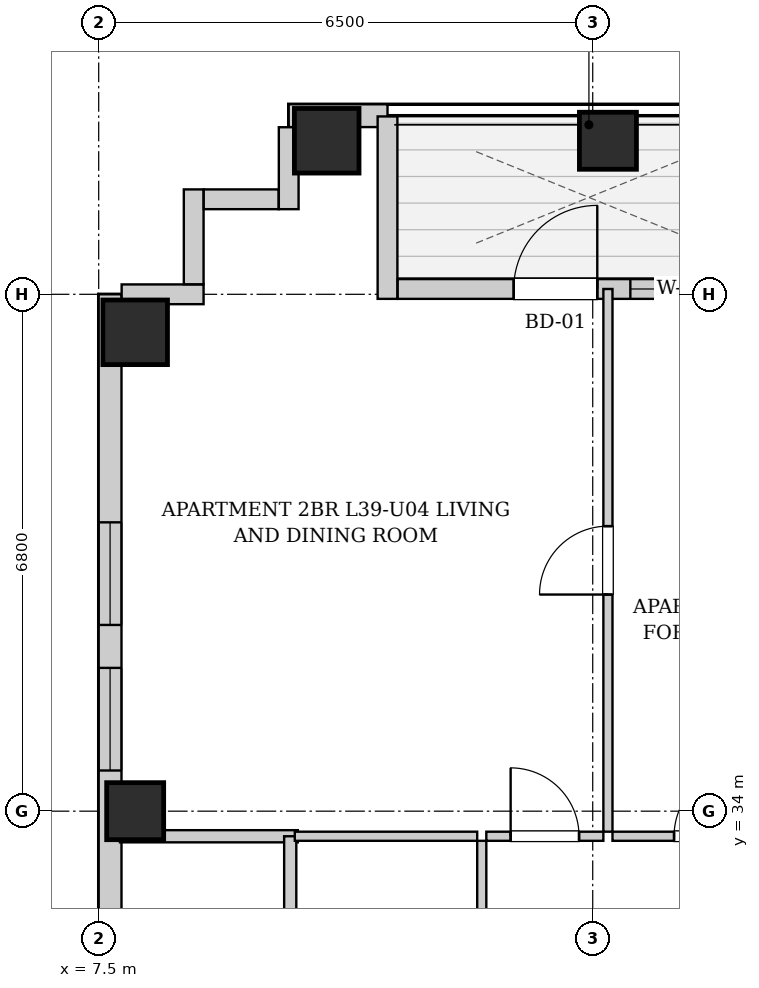
"""IFC4 building model, lengths in metres.
Left out: names, types, materials, properties, quantities, classifications, styles, units other than length and angle.
Written with IfcOpenShell. Run it as: python <this file> out.ifc"""

import sys

from ifc_helpers import new_model, si_unit, direction, frame, frame_2d, origin, origin_2d, place, context, subcontext, project, spatial, rectangle, extrude, element, fill, save


model = new_model("IFC4")
c1 = context("Model", 3, precision=1e-05, world=origin(), true_north=direction((0.0, 1.0)))
c2 = subcontext(c1, "Body", "Model", "MODEL_VIEW")
j1 = project(units=[si_unit("LENGTHUNIT", "METRE"), si_unit("PLANEANGLEUNIT", "RADIAN")], contexts=[c1])
p1 = place(None, origin())
s1 = spatial("IfcSite", under=j1, at=p1, CompositionType="ELEMENT")
p2 = place(p1, origin())
s2 = spatial("IfcBuilding", under=s1, at=p2, CompositionType="ELEMENT")
p3 = place(p2, frame((0.0, 0.0, 137.4)))
s3 = spatial("IfcBuildingStorey", under=s2, at=p3, CompositionType="ELEMENT", Elevation=137.4)
p4 = place(p3, frame((10.5, 42.82, 0.0), z_axis=(0.0, 0.0, 1.0), x_axis=(1.0, 0.0, 0.0)))
e1 = element("IfcColumn", 1, at=p4, inside=s3, PredefinedType="COLUMN", context=c2, shape_type="SweptSolid", body=[
    extrude(rectangle(XDim=0.85, YDim=0.85, at=origin_2d()), origin(), (0.0, 0.0, 1.0), 3.25),
])
for number, where, z_axis, x_axis in (
    (2, (14.2, 42.82, 0.0), (0.0, 0.0, 1.0), (1.0, 0.0, 0.0)),
    (3, (7.98, 34.0, 0.0), (0.0, 0.0, 1.0), (1.0, 0.0, 0.0)),
):
    element("IfcColumn", number, at=place(p3, frame(where, z_axis=z_axis, x_axis=x_axis)), inside=s3, PredefinedType="COLUMN", context=c2, shape_type="SweptSolid", body=[
        extrude(rectangle(XDim=0.75, YDim=0.75, at=origin_2d()), origin(), (0.0, 0.0, 1.0), 3.25),
    ])
p5 = place(p3, frame((7.98, 40.3, 0.0), z_axis=(0.0, 0.0, 1.0), x_axis=(1.0, 0.0, 0.0)))
e4 = element("IfcColumn", 4, at=p5, inside=s3, PredefinedType="COLUMN", context=c2, shape_type="SweptSolid", body=[
    extrude(rectangle(XDim=0.85, YDim=0.85, at=origin_2d()), origin(), (0.0, 0.0, 1.0), 3.25),
])
p6 = place(p3, frame((10.0, 43.15, 0.0), z_axis=(0.0, 0.0, 1.0), x_axis=(1.0, 0.0, 0.0)))
e5 = element("IfcWall", 5, at=p6, inside=s3, PredefinedType="SOLIDWALL", context=c2, shape_type="SweptSolid", body=[
    extrude(rectangle(XDim=1.3, YDim=0.3, at=frame_2d((0.65, 0.0))), origin(), (0.0, 0.0, 1.0), 2.99),
])
p7 = place(p3, frame((11.3, 43.14, 0.0), z_axis=(0.0, 0.0, 1.0), x_axis=(0.0, -1.0, 0.0)))
e6 = element("IfcWall", 6, at=p7, inside=s3, PredefinedType="SOLIDWALL", context=c2, shape_type="SweptSolid", body=[
    extrude(rectangle(XDim=2.4, YDim=0.26, at=frame_2d((1.2, 0.0))), origin(), (0.0, 0.0, 1.0), 2.99),
])
p8 = place(p3, frame((11.434, 40.87, 0.0), z_axis=(0.0, 0.0, 1.0), x_axis=(1.0, 0.0, 0.0)))
e7 = element("IfcWall", 7, at=p8, inside=s3, PredefinedType="SOLIDWALL", context=c2, shape_type="SweptSolid", body=[
    extrude(rectangle(XDim=5.032, YDim=0.26, at=frame_2d((2.516, 0.0))), origin(), (0.0, 0.0, 1.0), 2.99),
])
p9 = place(p8, frame((1.526, 0.0, 0.0)))
e8 = element("IfcOpeningElement", 8, at=p9, cuts=e7, PredefinedType="OPENING", context=c2, shape_type="SweptSolid", body=[
    extrude(rectangle(XDim=1.1, YDim=2.0, at=frame_2d((0.55, 1.0))), frame((0.0, 0.14, 0.0), z_axis=(0.0, -1.0, 0.0), x_axis=(1.0, 0.0, 0.0)), (0.0, 0.0, 1.0), 0.28),
])
p10 = place(p8, frame((3.061, 0.0, 0.85)))
e9 = element("IfcOpeningElement", 9, at=p10, cuts=e7, PredefinedType="OPENING", context=c2, shape_type="SweptSolid", body=[
    extrude(rectangle(XDim=1.35, YDim=1.65, at=frame_2d((0.675, 0.825))), frame((0.0, 0.14, 0.0), z_axis=(0.0, -1.0, 0.0), x_axis=(1.0, 0.0, 0.0)), (0.0, 0.0, 1.0), 0.28),
])
p11 = place(p3, frame((7.65, 6.3, 0.0), z_axis=(0.0, 0.0, 1.0), x_axis=(0.0, 1.0, 0.0)))
e10 = element("IfcWall", 10, at=p11, inside=s3, PredefinedType="SOLIDWALL", context=c2, shape_type="SweptSolid", body=[
    extrude(rectangle(XDim=34.5, YDim=0.3, at=frame_2d((17.25, 0.0))), origin(), (0.0, 0.0, 1.0), 2.99),
])
p12 = place(p11, frame((30.15, 0.0, 0.55)))
e11 = element("IfcOpeningElement", 11, at=p12, cuts=e10, PredefinedType="OPENING", context=c2, shape_type="SweptSolid", body=[
    extrude(rectangle(XDim=1.35, YDim=1.2, at=frame_2d((0.675, 0.6))), frame((0.0, 0.16, 0.0), z_axis=(0.0, -1.0, 0.0), x_axis=(1.0, 0.0, 0.0)), (0.0, 0.0, 1.0), 0.32),
])
p13 = place(p11, frame((28.235, 0.0, 0.55)))
e12 = element("IfcOpeningElement", 12, at=p13, cuts=e10, PredefinedType="OPENING", context=c2, shape_type="SweptSolid", body=[
    extrude(rectangle(XDim=1.35, YDim=1.2, at=frame_2d((0.675, 0.6))), frame((0.0, 0.16, 0.0), z_axis=(0.0, -1.0, 0.0), x_axis=(1.0, 0.0, 0.0)), (0.0, 0.0, 1.0), 0.32),
])
p14 = place(p11, frame((10.35, 0.0, 0.55)))
e13 = element("IfcOpeningElement", 13, at=p14, cuts=e10, PredefinedType="OPENING", context=c2, shape_type="SweptSolid", body=[
    extrude(rectangle(XDim=1.35, YDim=1.2, at=frame_2d((0.675, 0.6))), frame((0.0, 0.16, 0.0), z_axis=(0.0, -1.0, 0.0), x_axis=(1.0, 0.0, 0.0)), (0.0, 0.0, 1.0), 0.32),
])
p15 = place(p11, frame((19.725, 0.0, 0.55)))
e14 = element("IfcOpeningElement", 14, at=p15, cuts=e10, PredefinedType="OPENING", context=c2, shape_type="SweptSolid", body=[
    extrude(rectangle(XDim=1.35, YDim=1.2, at=frame_2d((0.675, 0.6))), frame((0.0, 0.16, 0.0), z_axis=(0.0, -1.0, 0.0), x_axis=(1.0, 0.0, 0.0)), (0.0, 0.0, 1.0), 0.32),
])
p16 = place(p3, frame((7.802, 40.8, 0.0), z_axis=(0.0, 0.0, 1.0), x_axis=(1.0, 0.0, 0.0)))
e15 = element("IfcWall", 15, at=p16, inside=s3, PredefinedType="SOLIDWALL", context=c2, shape_type="SweptSolid", body=[
    extrude(rectangle(XDim=1.078, YDim=0.26, at=frame_2d((0.539, 0.0))), origin(), (0.0, 0.0, 1.0), 2.99),
])
p17 = place(p3, frame((8.75, 40.932, 0.0), z_axis=(0.0, 0.0, 1.0), x_axis=(0.0, 1.0, 0.0)))
e16 = element("IfcWall", 16, at=p17, inside=s3, PredefinedType="SOLIDWALL", context=c2, shape_type="SweptSolid", body=[
    extrude(rectangle(XDim=1.248, YDim=0.26, at=frame_2d((0.624, 0.0))), origin(), (0.0, 0.0, 1.0), 2.99),
])
p18 = place(p3, frame((8.882, 42.05, 0.0), z_axis=(0.0, 0.0, 1.0), x_axis=(1.0, 0.0, 0.0)))
e17 = element("IfcWall", 17, at=p18, inside=s3, PredefinedType="SOLIDWALL", context=c2, shape_type="SweptSolid", body=[
    extrude(rectangle(XDim=0.986, YDim=0.26, at=frame_2d((0.493, 0.0))), origin(), (0.0, 0.0, 1.0), 2.99),
])
p19 = place(p3, frame((10.0, 41.92, 0.0), z_axis=(0.0, 0.0, 1.0), x_axis=(0.0, 1.0, 0.0)))
e18 = element("IfcWall", 18, at=p19, inside=s3, PredefinedType="SOLIDWALL", context=c2, shape_type="SweptSolid", body=[
    extrude(rectangle(XDim=1.078, YDim=0.26, at=frame_2d((0.539, 0.0))), origin(), (0.0, 0.0, 1.0), 2.99),
])
p20 = place(p3, frame((7.78, 33.67, 0.0), z_axis=(0.0, 0.0, 1.0), x_axis=(1.0, 0.0, 0.0)))
e19 = element("IfcWall", 19, at=p20, inside=s3, PredefinedType="PARTITIONING", context=c2, shape_type="SweptSolid", body=[
    extrude(rectangle(XDim=2.34, YDim=0.16, at=frame_2d((1.17, 0.0))), origin(), (0.0, 0.0, 1.0), 2.99),
])
p21 = place(p3, frame((10.02, 30.76, 0.0), z_axis=(0.0, 0.0, 1.0), x_axis=(0.0, 1.0, 0.0)))
e20 = element("IfcWall", 20, at=p21, inside=s3, PredefinedType="PARTITIONING", context=c2, shape_type="SweptSolid", body=[
    extrude(rectangle(XDim=2.91, YDim=0.16, at=frame_2d((1.455, 0.0))), origin(), (0.0, 0.0, 1.0), 2.99),
])
p22 = place(p3, frame((12.54, 30.76, 0.0), z_axis=(0.0, 0.0, 1.0), x_axis=(0.0, 1.0, 0.0)))
e21 = element("IfcWall", 21, at=p22, inside=s3, PredefinedType="PARTITIONING", context=c2, shape_type="SweptSolid", body=[
    extrude(rectangle(XDim=2.85, YDim=0.12, at=frame_2d((1.425, 0.0))), origin(), (0.0, 0.0, 1.0), 2.99),
])
p23 = place(p22, frame((0.995, 0.0, 0.0)))
e22 = element("IfcOpeningElement", 22, at=p23, cuts=e21, PredefinedType="OPENING", context=c2, shape_type="SweptSolid", body=[
    extrude(rectangle(XDim=0.86, YDim=2.05, at=frame_2d((0.43, 1.025))), frame((0.0, 0.07, 0.0), z_axis=(0.0, -1.0, 0.0), x_axis=(1.0, 0.0, 0.0)), (0.0, 0.0, 1.0), 0.14),
])
p24 = place(p3, frame((10.08, 33.67, 0.0), z_axis=(0.0, 0.0, 1.0), x_axis=(1.0, 0.0, 0.0)))
e23 = element("IfcWall", 23, at=p24, inside=s3, PredefinedType="PARTITIONING", context=c2, shape_type="SweptSolid", body=[
    extrude(rectangle(XDim=2.4, YDim=0.12, at=frame_2d((1.2, 0.0))), origin(), (0.0, 0.0, 1.0), 2.99),
])
p25 = place(p3, frame((12.6, 33.67, 0.0), z_axis=(0.0, 0.0, 1.0), x_axis=(1.0, 0.0, 0.0)))
e24 = element("IfcWall", 24, at=p25, inside=s3, PredefinedType="PARTITIONING", context=c2, shape_type="SweptSolid", body=[
    extrude(rectangle(XDim=1.54, YDim=0.12, at=frame_2d((0.77, 0.0))), origin(), (0.0, 0.0, 1.0), 2.99),
])
p26 = place(p25, frame((0.32, 0.0, 0.0)))
e25 = element("IfcOpeningElement", 25, at=p26, cuts=e24, PredefinedType="OPENING", context=c2, shape_type="SweptSolid", body=[
    extrude(rectangle(XDim=0.9, YDim=2.05, at=frame_2d((0.45, 1.025))), frame((0.0, 0.07, 0.0), z_axis=(0.0, -1.0, 0.0), x_axis=(1.0, 0.0, 0.0)), (0.0, 0.0, 1.0), 0.14),
])
p27 = place(p3, frame((14.26, 33.67, 0.0), z_axis=(0.0, 0.0, 1.0), x_axis=(1.0, 0.0, 0.0)))
e26 = element("IfcWall", 26, at=p27, inside=s3, PredefinedType="PARTITIONING", context=c2, shape_type="SweptSolid", body=[
    extrude(rectangle(XDim=2.52, YDim=0.12, at=frame_2d((1.26, 0.0))), origin(), (0.0, 0.0, 1.0), 2.99),
])
p28 = place(p27, frame((0.81, 0.0, 0.0)))
e27 = element("IfcOpeningElement", 27, at=p28, cuts=e26, PredefinedType="OPENING", context=c2, shape_type="SweptSolid", body=[
    extrude(rectangle(XDim=0.9, YDim=2.05, at=frame_2d((0.45, 1.025))), frame((0.0, 0.07, 0.0), z_axis=(0.0, -1.0, 0.0), x_axis=(1.0, 0.0, 0.0)), (0.0, 0.0, 1.0), 0.14),
])
p29 = place(p3, frame((14.2, 33.73, 0.0), z_axis=(0.0, 0.0, 1.0), x_axis=(0.0, 1.0, 0.0)))
e28 = element("IfcWall", 28, at=p29, inside=s3, PredefinedType="PARTITIONING", context=c2, shape_type="SweptSolid", body=[
    extrude(rectangle(XDim=7.14, YDim=0.12, at=frame_2d((3.57, 0.0))), origin(), (0.0, 0.0, 1.0), 2.99),
])
p30 = place(p29, frame((3.12, 0.0, 0.0)))
e29 = element("IfcOpeningElement", 29, at=p30, cuts=e28, PredefinedType="OPENING", context=c2, shape_type="SweptSolid", body=[
    extrude(rectangle(XDim=0.9, YDim=2.05, at=frame_2d((0.45, 1.025))), frame((0.0, 0.07, 0.0), z_axis=(0.0, -1.0, 0.0), x_axis=(1.0, 0.0, 0.0)), (0.0, 0.0, 1.0), 0.14),
])
p31 = place(p26, origin())
e30 = element("IfcDoor", 30, at=p31, inside=s3, OperationType="SINGLE_SWING_LEFT", PredefinedType="DOOR", context=c2, shape_type="SweptSolid", body=[
    extrude(rectangle(XDim=0.9, YDim=2.05, at=frame_2d((0.45, 1.025))), frame((0.0, 0.025, 0.0), z_axis=(0.0, -1.0, 0.0), x_axis=(1.0, 0.0, 0.0)), (0.0, 0.0, 1.0), 0.05),
])
fill(e25, e30)
p32 = place(p28, origin())
e31 = element("IfcDoor", 31, at=p32, inside=s3, OperationType="SINGLE_SWING_RIGHT", PredefinedType="DOOR", context=c2, shape_type="SweptSolid", body=[
    extrude(rectangle(XDim=0.9, YDim=2.05, at=frame_2d((0.45, 1.025))), frame((0.0, 0.025, 0.0), z_axis=(0.0, -1.0, 0.0), x_axis=(1.0, 0.0, 0.0)), (0.0, 0.0, 1.0), 0.05),
])
fill(e27, e31)
p33 = place(p30, origin())
e32 = element("IfcDoor", 32, at=p33, inside=s3, OperationType="SINGLE_SWING_LEFT", PredefinedType="DOOR", context=c2, shape_type="SweptSolid", body=[
    extrude(rectangle(XDim=0.9, YDim=2.05, at=frame_2d((0.45, 1.025))), frame((0.0, 0.025, 0.0), z_axis=(0.0, -1.0, 0.0), x_axis=(1.0, 0.0, 0.0)), (0.0, 0.0, 1.0), 0.05),
])
fill(e29, e32)
p34 = place(p9, origin())
e33 = element("IfcDoor", 33, at=p34, inside=s3, OperationType="SINGLE_SWING_RIGHT", PredefinedType="DOOR", context=c2, shape_type="SweptSolid", body=[
    extrude(rectangle(XDim=1.1, YDim=2.0, at=frame_2d((0.55, 1.0))), frame((0.0, 0.025, 0.0), z_axis=(0.0, -1.0, 0.0), x_axis=(1.0, 0.0, 0.0)), (0.0, 0.0, 1.0), 0.05),
])
fill(e8, e33)
p35 = place(p12, origin())
e34 = element("IfcWindow", 34, at=p35, inside=s3, PartitioningType="SINGLE_PANEL", PredefinedType="WINDOW", context=c2, shape_type="SweptSolid", body=[
    extrude(rectangle(XDim=1.35, YDim=1.2, at=frame_2d((0.675, 0.6))), frame((0.0, 0.03, 0.0), z_axis=(0.0, -1.0, 0.0), x_axis=(1.0, 0.0, 0.0)), (0.0, 0.0, 1.0), 0.06),
])
fill(e11, e34)
p36 = place(p13, origin())
e35 = element("IfcWindow", 35, at=p36, inside=s3, PartitioningType="SINGLE_PANEL", PredefinedType="WINDOW", context=c2, shape_type="SweptSolid", body=[
    extrude(rectangle(XDim=1.35, YDim=1.2, at=frame_2d((0.675, 0.6))), frame((0.0, 0.03, 0.0), z_axis=(0.0, -1.0, 0.0), x_axis=(1.0, 0.0, 0.0)), (0.0, 0.0, 1.0), 0.06),
])
fill(e12, e35)
p37 = place(p10, origin())
e36 = element("IfcWindow", 36, at=p37, inside=s3, PartitioningType="SINGLE_PANEL", PredefinedType="WINDOW", context=c2, shape_type="SweptSolid", body=[
    extrude(rectangle(XDim=1.35, YDim=1.65, at=frame_2d((0.675, 0.825))), frame((0.0, 0.03, 0.0), z_axis=(0.0, -1.0, 0.0), x_axis=(1.0, 0.0, 0.0)), (0.0, 0.0, 1.0), 0.06),
])
fill(e9, e36)
save(model, sys.argv[1])
